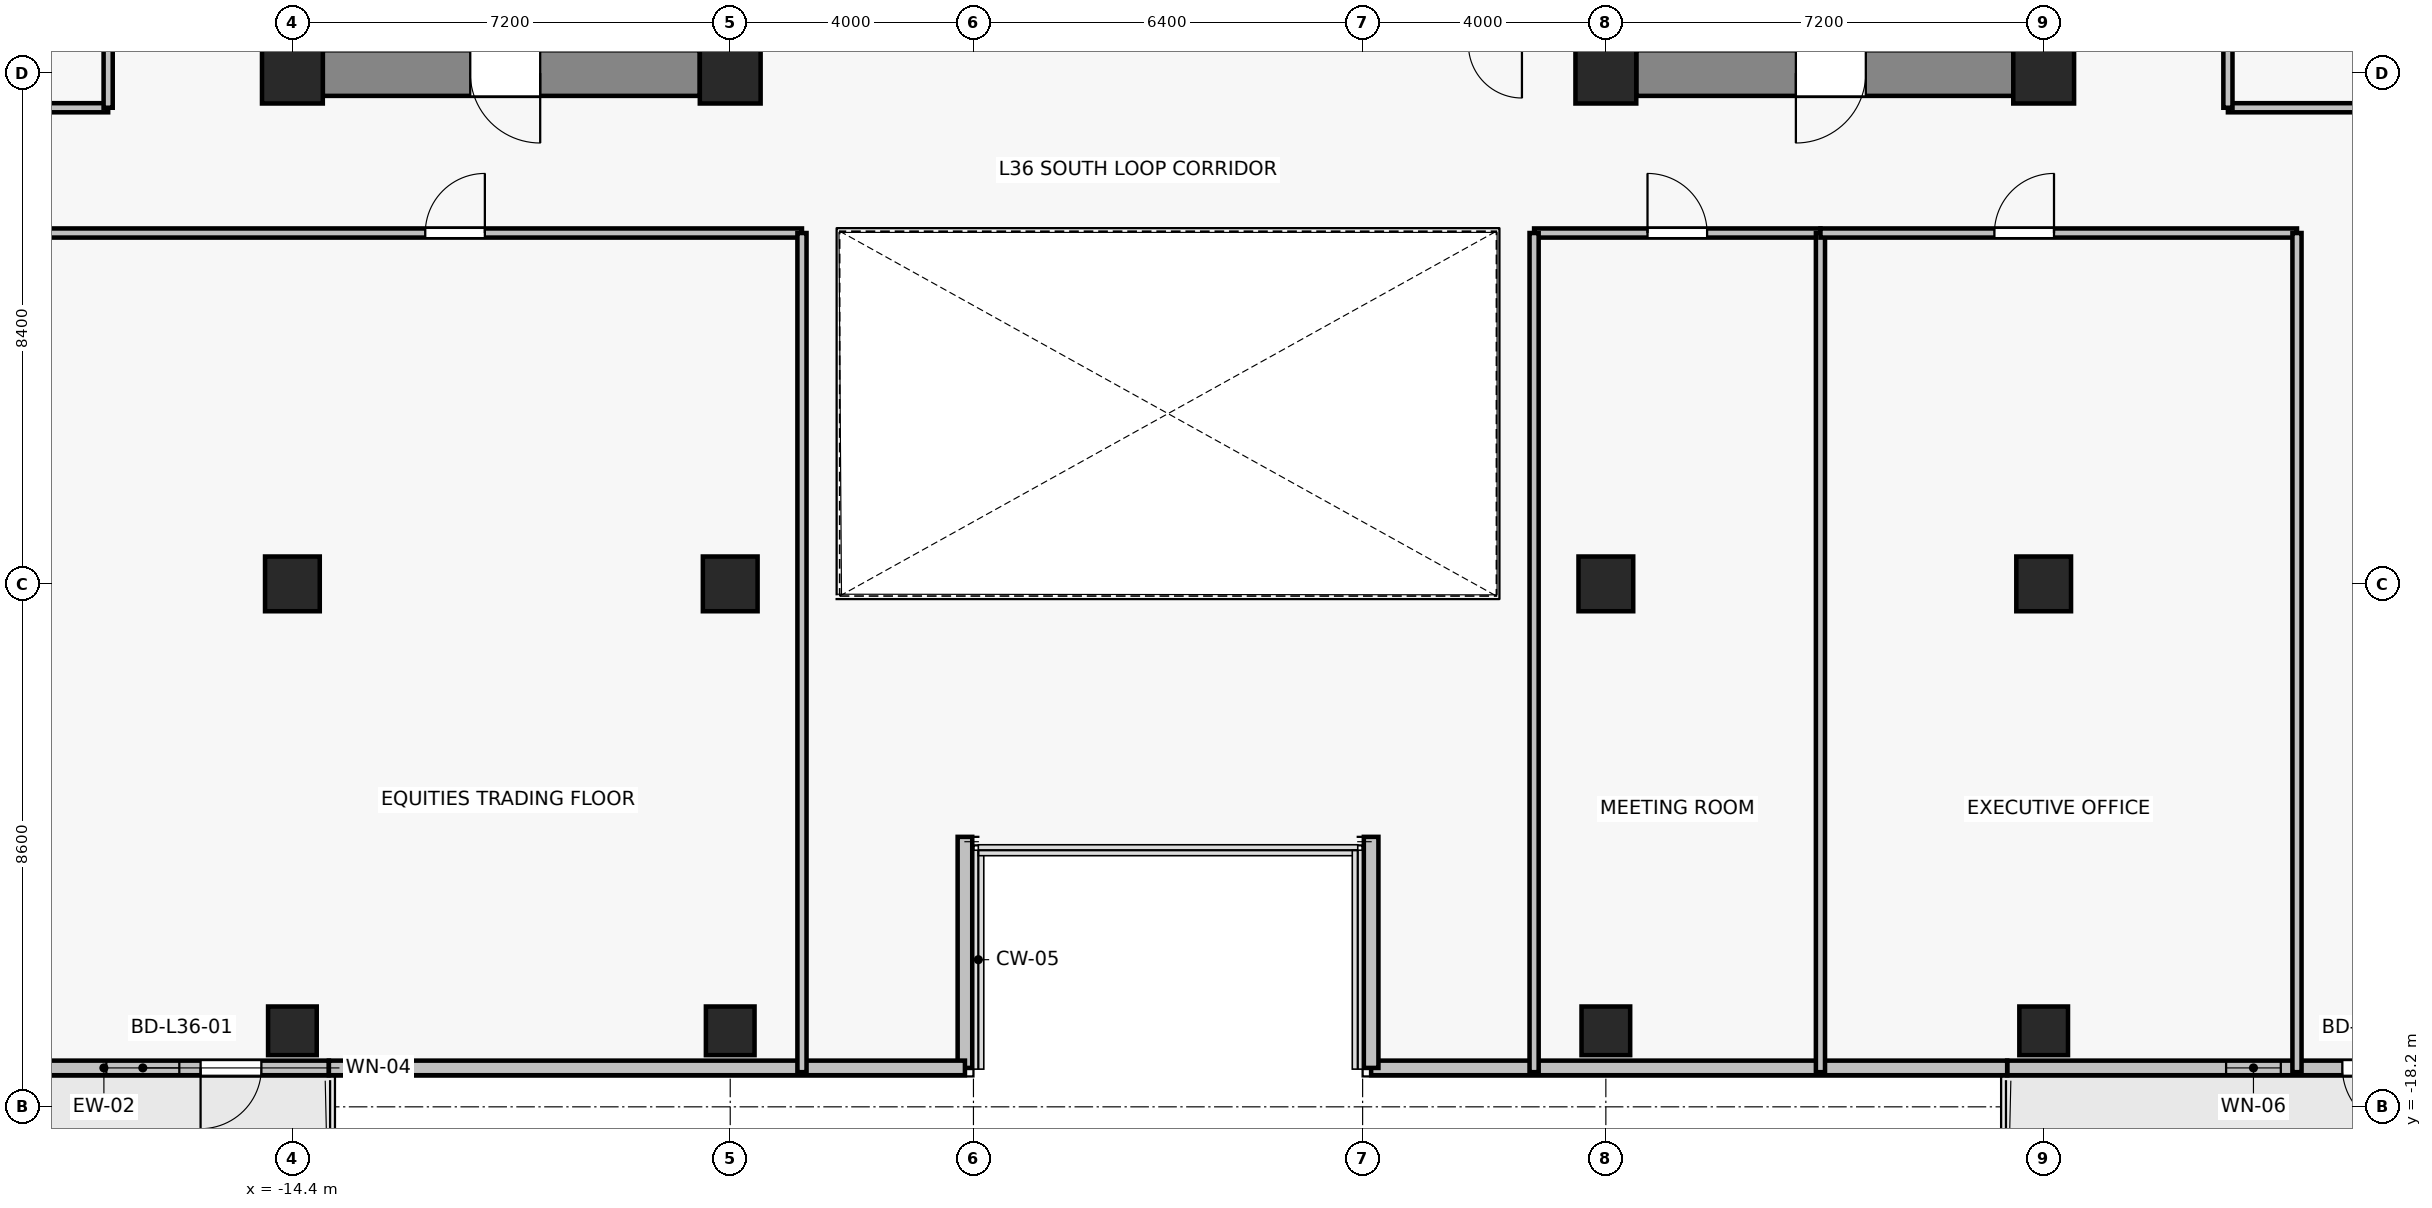
"""IFC4 building model, lengths in metres.
Left out: names, types, materials, properties, quantities, classifications, styles, units other than length and angle.
Written with IfcOpenShell. Run it as: python <this file> out.ifc"""

import sys

from ifc_helpers import new_model, si_unit, direction, frame, frame_2d, origin, origin_2d, place, context, subcontext, project, spatial, rectangle, extrude, source, transform, mapped, element, fill, save


model = new_model("IFC4")
c1 = context("Model", 3, precision=1e-05, world=origin(), true_north=direction((0.0, 1.0)))
c2 = subcontext(c1, "Body", "Model", "MODEL_VIEW")
j1 = project(units=[si_unit("LENGTHUNIT", "METRE"), si_unit("PLANEANGLEUNIT", "RADIAN")], contexts=[c1])
p1 = place(None, origin())
s1 = spatial("IfcSite", under=j1, at=p1, CompositionType="ELEMENT")
p2 = place(p1, origin())
s2 = spatial("IfcBuilding", under=s1, at=p2, CompositionType="ELEMENT")
p3 = place(p2, frame((0.0, 0.0, 129.7)))
s3 = spatial("IfcBuildingStorey", under=s2, at=p3, CompositionType="ELEMENT", Elevation=129.7)
for number, where, z_axis, x_axis in (
    (1, (-14.4, -1.2, 0.0), (0.0, 0.0, 1.0), (1.0, 0.0, 0.0)),
    (2, (-7.2, -1.2, 0.0), (0.0, 0.0, 1.0), (1.0, 0.0, 0.0)),
    (3, (7.2, -1.2, 0.0), (0.0, 0.0, 1.0), (1.0, 0.0, 0.0)),
    (4, (14.4, -1.2, 0.0), (0.0, 0.0, 1.0), (1.0, 0.0, 0.0)),
):
    element("IfcColumn", number, at=place(p3, frame(where, z_axis=z_axis, x_axis=x_axis)), inside=s3, PredefinedType="COLUMN", context=c2, shape_type="SweptSolid", body=[
        extrude(rectangle(XDim=1.0, YDim=1.0, at=origin_2d()), origin(), (0.0, 0.0, 1.0), 3.3),
    ])
for number, where, z_axis, x_axis in (
    (5, (-14.4, -9.6, 0.0), (0.0, 0.0, 1.0), (1.0, 0.0, 0.0)),
    (6, (-7.2, -9.6, 0.0), (0.0, 0.0, 1.0), (1.0, 0.0, 0.0)),
    (7, (7.2, -9.6, 0.0), (0.0, 0.0, 1.0), (1.0, 0.0, 0.0)),
    (8, (14.4, -9.6, 0.0), (0.0, 0.0, 1.0), (1.0, 0.0, 0.0)),
):
    element("IfcColumn", number, at=place(p3, frame(where, z_axis=z_axis, x_axis=x_axis)), inside=s3, PredefinedType="COLUMN", context=c2, shape_type="SweptSolid", body=[
        extrude(rectangle(XDim=0.9, YDim=0.9, at=origin_2d()), origin(), (0.0, 0.0, 1.0), 3.3),
    ])
for number, where, z_axis, x_axis in (
    (9, (-14.4, -16.95, 0.0), (0.0, 0.0, 1.0), (1.0, 0.0, 0.0)),
    (10, (-7.2, -16.95, 0.0), (0.0, 0.0, 1.0), (1.0, 0.0, 0.0)),
    (11, (7.2, -16.95, 0.0), (0.0, 0.0, 1.0), (1.0, 0.0, 0.0)),
    (12, (14.4, -16.95, 0.0), (0.0, 0.0, 1.0), (1.0, 0.0, 0.0)),
):
    element("IfcColumn", number, at=place(p3, frame(where, z_axis=z_axis, x_axis=x_axis)), inside=s3, PredefinedType="COLUMN", context=c2, shape_type="SweptSolid", body=[
        extrude(rectangle(XDim=0.8, YDim=0.8, at=origin_2d()), origin(), (0.0, 0.0, 1.0), 3.3),
    ])
p4 = place(p3, frame((-7.7, -1.2, 0.0), z_axis=(0.0, 0.0, 1.0), x_axis=(-1.0, 0.0, 0.0)))
e13 = element("IfcWall", 13, at=p4, inside=s3, PredefinedType="SHEAR", context=c2, shape_type="SweptSolid", body=[
    extrude(rectangle(XDim=6.2, YDim=0.75, at=frame_2d((3.1, 0.0))), origin(), (0.0, 0.0, 1.0), 3.075),
])
p5 = place(p4, frame((2.625, 0.0, 0.0)))
e14 = element("IfcOpeningElement", 14, at=p5, cuts=e13, PredefinedType="OPENING", context=c2, shape_type="SweptSolid", body=[
    extrude(rectangle(XDim=1.15, YDim=2.15, at=frame_2d((0.575, 1.075))), frame((0.0, 0.385, 0.0), z_axis=(0.0, -1.0, 0.0), x_axis=(1.0, 0.0, 0.0)), (0.0, 0.0, 1.0), 0.77),
])
p6 = place(p3, frame((13.9, -1.2, 0.0), z_axis=(0.0, 0.0, 1.0), x_axis=(-1.0, 0.0, 0.0)))
e15 = element("IfcWall", 15, at=p6, inside=s3, PredefinedType="SHEAR", context=c2, shape_type="SweptSolid", body=[
    extrude(rectangle(XDim=6.2, YDim=0.75, at=frame_2d((3.1, 0.0))), origin(), (0.0, 0.0, 1.0), 3.075),
])
p7 = place(p6, frame((2.425, 0.0, 0.0)))
e16 = element("IfcOpeningElement", 16, at=p7, cuts=e15, PredefinedType="OPENING", context=c2, shape_type="SweptSolid", body=[
    extrude(rectangle(XDim=1.15, YDim=2.15, at=frame_2d((0.575, 1.075))), frame((0.0, 0.385, 0.0), z_axis=(0.0, -1.0, 0.0), x_axis=(1.0, 0.0, 0.0)), (0.0, 0.0, 1.0), 0.77),
])
p8 = place(p3, frame((-13.8, -17.56, 0.0), z_axis=(0.0, 0.0, 1.0), x_axis=(-1.0, 0.0, 0.0)))
e17 = element("IfcWall", 17, at=p8, inside=s3, PredefinedType="SOLIDWALL", context=c2, shape_type="SweptSolid", body=[
    extrude(rectangle(XDim=7.4, YDim=0.24, at=frame_2d((3.7, 0.0))), origin(), (0.0, 0.0, 1.0), 2.665),
])
p9 = place(p8, frame((1.11, 0.0, 0.0)))
e18 = element("IfcOpeningElement", 18, at=p9, cuts=e17, PredefinedType="OPENING", context=c2, shape_type="SweptSolid", body=[
    extrude(rectangle(XDim=1.0, YDim=2.2, at=frame_2d((0.5, 1.1))), frame((0.0, 0.13, 0.0), z_axis=(0.0, -1.0, 0.0), x_axis=(1.0, 0.0, 0.0)), (0.0, 0.0, 1.0), 0.26),
])
p10 = place(p8, frame((2.46, 0.0, 0.85)))
e19 = element("IfcOpeningElement", 19, at=p10, cuts=e17, PredefinedType="OPENING", context=c2, shape_type="SweptSolid", body=[
    extrude(rectangle(XDim=1.2, YDim=1.5, at=frame_2d((0.6, 0.75))), frame((0.0, 0.13, 0.0), z_axis=(0.0, -1.0, 0.0), x_axis=(1.0, 0.0, 0.0)), (0.0, 0.0, 1.0), 0.26),
])
p11 = place(p3, frame((21.2, -17.56, 0.0), z_axis=(0.0, 0.0, 1.0), x_axis=(-1.0, 0.0, 0.0)))
e20 = element("IfcWall", 20, at=p11, inside=s3, PredefinedType="SOLIDWALL", context=c2, shape_type="SweptSolid", body=[
    extrude(rectangle(XDim=7.4, YDim=0.24, at=frame_2d((3.7, 0.0))), origin(), (0.0, 0.0, 1.0), 2.665),
])
p12 = place(p11, frame((0.888, 0.0, 0.0)))
e21 = element("IfcOpeningElement", 21, at=p12, cuts=e20, PredefinedType="OPENING", context=c2, shape_type="SweptSolid", body=[
    extrude(rectangle(XDim=1.0, YDim=2.2, at=frame_2d((0.5, 1.1))), frame((0.0, 0.13, 0.0), z_axis=(0.0, -1.0, 0.0), x_axis=(1.0, 0.0, 0.0)), (0.0, 0.0, 1.0), 0.26),
])
p13 = place(p11, frame((2.9, 0.0, 0.85)))
e22 = element("IfcOpeningElement", 22, at=p13, cuts=e20, PredefinedType="OPENING", context=c2, shape_type="SweptSolid", body=[
    extrude(rectangle(XDim=0.9, YDim=1.35, at=frame_2d((0.45, 0.675))), frame((0.0, 0.13, 0.0), z_axis=(0.0, -1.0, 0.0), x_axis=(1.0, 0.0, 0.0)), (0.0, 0.0, 1.0), 0.26),
])
p14 = place(p3, frame((3.34, -17.56, 0.0), z_axis=(0.0, 0.0, 1.0), x_axis=(1.0, 0.0, 0.0)))
e23 = element("IfcWall", 23, at=p14, inside=s3, PredefinedType="SOLIDWALL", context=c2, shape_type="SweptSolid", body=[
    extrude(rectangle(XDim=10.46, YDim=0.24, at=frame_2d((5.23, 0.0))), origin(), (0.0, 0.0, 1.0), 2.665),
])
for number, where, z_axis, x_axis in (
    (24, (3.34, -13.76, 0.0), (0.0, 0.0, 1.0), (0.0, -1.0, 0.0)),
    (25, (-3.34, -17.56, 0.0), (0.0, 0.0, 1.0), (0.0, 1.0, 0.0)),
):
    element("IfcWall", number, at=place(p3, frame(where, z_axis=z_axis, x_axis=x_axis)), inside=s3, PredefinedType="SOLIDWALL", context=c2, shape_type="SweptSolid", body=[
        extrude(rectangle(XDim=3.8, YDim=0.24, at=frame_2d((1.9, 0.0))), origin(), (0.0, 0.0, 1.0), 2.515),
    ])
p15 = place(p3, frame((-13.8, -17.56, 0.0), z_axis=(0.0, 0.0, 1.0), x_axis=(1.0, 0.0, 0.0)))
e26 = element("IfcWall", 26, at=p15, inside=s3, PredefinedType="SOLIDWALL", context=c2, shape_type="SweptSolid", body=[
    extrude(rectangle(XDim=10.46, YDim=0.24, at=frame_2d((5.23, 0.0))), origin(), (0.0, 0.0, 1.0), 2.665),
])
p16 = place(p3, frame((-25.53, -3.83, 0.0), z_axis=(0.0, 0.0, 1.0), x_axis=(1.0, 0.0, 0.0)))
e27 = element("IfcWall", 27, at=p16, inside=s3, PredefinedType="PARTITIONING", context=c2, shape_type="SweptSolid", body=[
    extrude(rectangle(XDim=19.51, YDim=0.15, at=frame_2d((9.755, 0.0))), origin(), (0.0, 0.0, 1.0), 2.515),
])
p17 = place(p16, frame((13.315, 0.0, 0.0)))
e28 = element("IfcOpeningElement", 28, at=p17, cuts=e27, PredefinedType="OPENING", context=c2, shape_type="SweptSolid", body=[
    extrude(rectangle(XDim=0.98, YDim=2.15, at=frame_2d((0.49, 1.075))), frame((0.0, 0.085, 0.0), z_axis=(0.0, -1.0, 0.0), x_axis=(1.0, 0.0, 0.0)), (0.0, 0.0, 1.0), 0.17),
])
p18 = place(p3, frame((-6.02, -3.83, 0.0), z_axis=(0.0, 0.0, 1.0), x_axis=(0.0, -1.0, 0.0)))
e29 = element("IfcWall", 29, at=p18, inside=s3, PredefinedType="PARTITIONING", context=c2, shape_type="SweptSolid", body=[
    extrude(rectangle(XDim=13.8, YDim=0.15, at=frame_2d((6.9, 0.0))), origin(), (0.0, 0.0, 1.0), 2.515),
])
p19 = place(p3, frame((6.02, -3.83, 0.0), z_axis=(0.0, 0.0, 1.0), x_axis=(1.0, 0.0, 0.0)))
e30 = element("IfcWall", 30, at=p19, inside=s3, PredefinedType="PARTITIONING", context=c2, shape_type="SweptSolid", body=[
    extrude(rectangle(XDim=4.709, YDim=0.15, at=frame_2d((2.354, 0.0))), origin(), (0.0, 0.0, 1.0), 2.515),
])
p20 = place(p19, frame((1.865, 0.0, 0.0)))
e31 = element("IfcOpeningElement", 31, at=p20, cuts=e30, PredefinedType="OPENING", context=c2, shape_type="SweptSolid", body=[
    extrude(rectangle(XDim=0.98, YDim=2.15, at=frame_2d((0.49, 1.075))), frame((0.0, 0.085, 0.0), z_axis=(0.0, -1.0, 0.0), x_axis=(1.0, 0.0, 0.0)), (0.0, 0.0, 1.0), 0.17),
])
for number, where, z_axis, x_axis in (
    (32, (6.02, -17.63, 0.0), (0.0, 0.0, 1.0), (0.0, 1.0, 0.0)),
    (33, (10.729, -3.83, 0.0), (0.0, 0.0, 1.0), (0.0, -1.0, 0.0)),
):
    element("IfcWall", number, at=place(p3, frame(where, z_axis=z_axis, x_axis=x_axis)), inside=s3, PredefinedType="PARTITIONING", context=c2, shape_type="SweptSolid", body=[
        extrude(rectangle(XDim=13.8, YDim=0.15, at=frame_2d((6.9, 0.0))), origin(), (0.0, 0.0, 1.0), 2.515),
    ])
p21 = place(p3, frame((10.729, -3.83, 0.0), z_axis=(0.0, 0.0, 1.0), x_axis=(1.0, 0.0, 0.0)))
e34 = element("IfcWall", 34, at=p21, inside=s3, PredefinedType="PARTITIONING", context=c2, shape_type="SweptSolid", body=[
    extrude(rectangle(XDim=7.837, YDim=0.15, at=frame_2d((3.918, 0.0))), origin(), (0.0, 0.0, 1.0), 2.515),
])
p22 = place(p21, frame((2.861, 0.0, 0.0)))
e35 = element("IfcOpeningElement", 35, at=p22, cuts=e34, PredefinedType="OPENING", context=c2, shape_type="SweptSolid", body=[
    extrude(rectangle(XDim=0.98, YDim=2.15, at=frame_2d((0.49, 1.075))), frame((0.0, 0.085, 0.0), z_axis=(0.0, -1.0, 0.0), x_axis=(1.0, 0.0, 0.0)), (0.0, 0.0, 1.0), 0.17),
])
p23 = place(p3, frame((18.566, -3.83, 0.0), z_axis=(0.0, 0.0, 1.0), x_axis=(0.0, -1.0, 0.0)))
e36 = element("IfcWall", 36, at=p23, inside=s3, PredefinedType="PARTITIONING", context=c2, shape_type="SweptSolid", body=[
    extrude(rectangle(XDim=13.8, YDim=0.15, at=frame_2d((6.9, 0.0))), origin(), (0.0, 0.0, 1.0), 2.515),
])
p24 = place(p3, frame((-17.43, -1.77, 0.0), z_axis=(0.0, 0.0, 1.0), x_axis=(-1.0, 0.0, 0.0)))
e37 = element("IfcWall", 37, at=p24, inside=s3, PredefinedType="PARTITIONING", context=c2, shape_type="SweptSolid", body=[
    extrude(rectangle(XDim=8.1, YDim=0.15, at=frame_2d((4.05, 0.0))), origin(), (0.0, 0.0, 1.0), 2.515),
])
p25 = place(p3, frame((-17.43, 13.88, 0.0), z_axis=(0.0, 0.0, 1.0), x_axis=(0.0, -1.0, 0.0)))
e38 = element("IfcWall", 38, at=p25, inside=s3, PredefinedType="PARTITIONING", context=c2, shape_type="SweptSolid", body=[
    extrude(rectangle(XDim=15.65, YDim=0.15, at=frame_2d((7.825, 0.0))), origin(), (0.0, 0.0, 1.0), 2.515),
])
p26 = place(p25, frame((7.335, 0.0, 0.0)))
e39 = element("IfcOpeningElement", 39, at=p26, cuts=e38, PredefinedType="OPENING", context=c2, shape_type="SweptSolid", body=[
    extrude(rectangle(XDim=0.98, YDim=2.15, at=frame_2d((0.49, 1.075))), frame((0.0, 0.085, 0.0), z_axis=(0.0, -1.0, 0.0), x_axis=(1.0, 0.0, 0.0)), (0.0, 0.0, 1.0), 0.17),
])
p27 = place(p3, frame((29.53, -1.77, 0.0), z_axis=(0.0, 0.0, 1.0), x_axis=(-1.0, 0.0, 0.0)))
e40 = element("IfcWall", 40, at=p27, inside=s3, PredefinedType="PARTITIONING", context=c2, shape_type="SweptSolid", body=[
    extrude(rectangle(XDim=12.1, YDim=0.15, at=frame_2d((6.05, 0.0))), origin(), (0.0, 0.0, 1.0), 2.515),
])
p28 = place(p3, frame((17.43, -1.77, 0.0), z_axis=(0.0, 0.0, 1.0), x_axis=(0.0, 1.0, 0.0)))
e41 = element("IfcWall", 41, at=p28, inside=s3, PredefinedType="PARTITIONING", context=c2, shape_type="SweptSolid", body=[
    extrude(rectangle(XDim=3.23, YDim=0.15, at=frame_2d((1.615, 0.0))), origin(), (0.0, 0.0, 1.0), 2.515),
])
p29 = place(p28, frame((1.125, 0.0, 0.0)))
e42 = element("IfcOpeningElement", 42, at=p29, cuts=e41, PredefinedType="OPENING", context=c2, shape_type="SweptSolid", body=[
    extrude(rectangle(XDim=0.98, YDim=2.15, at=frame_2d((0.49, 1.075))), frame((0.0, 0.085, 0.0), z_axis=(0.0, -1.0, 0.0), x_axis=(1.0, 0.0, 0.0)), (0.0, 0.0, 1.0), 0.17),
])
m1 = source(origin(), c2, "Body", "SweptSolid", [
    extrude(rectangle(XDim=1.0, YDim=2.2, at=frame_2d((0.5, 1.1))), frame((0.0, 0.025, 0.0), z_axis=(0.0, -1.0, 0.0), x_axis=(1.0, 0.0, 0.0)), (0.0, 0.0, 1.0), 0.05),
])
p30 = place(p9, origin())
e43 = element("IfcDoor", 43, at=p30, inside=s3, OperationType="SINGLE_SWING_RIGHT", PredefinedType="DOOR", context=c2, shape_type="MappedRepresentation", body=[
    mapped(m1, transform((0.0, 0.0, 0.0), x_axis=(1.0, 0.0, 0.0), y_axis=(0.0, 1.0, 0.0), z_axis=(0.0, 0.0, 1.0), scale=1.0)),
])
fill(e18, e43)
m2 = source(origin(), c2, "Body", "SweptSolid", [
    extrude(rectangle(XDim=1.2, YDim=1.5, at=frame_2d((0.6, 0.75))), frame((0.0, 0.03, 0.0), z_axis=(0.0, -1.0, 0.0), x_axis=(1.0, 0.0, 0.0)), (0.0, 0.0, 1.0), 0.06),
])
p31 = place(p10, origin())
e44 = element("IfcWindow", 44, at=p31, inside=s3, PartitioningType="SINGLE_PANEL", PredefinedType="WINDOW", context=c2, shape_type="MappedRepresentation", body=[
    mapped(m2, transform((0.0, 0.0, 0.0), x_axis=(1.0, 0.0, 0.0), y_axis=(0.0, 1.0, 0.0), z_axis=(0.0, 0.0, 1.0), scale=1.0)),
])
fill(e19, e44)
p32 = place(p12, origin())
e45 = element("IfcDoor", 45, at=p32, inside=s3, OperationType="SINGLE_SWING_LEFT", PredefinedType="DOOR", context=c2, shape_type="MappedRepresentation", body=[
    mapped(m1, transform((0.0, 0.0, 0.0), x_axis=(1.0, 0.0, 0.0), y_axis=(0.0, 1.0, 0.0), z_axis=(0.0, 0.0, 1.0), scale=1.0)),
])
fill(e21, e45)
m3 = source(origin(), c2, "Body", "SweptSolid", [
    extrude(rectangle(XDim=0.9, YDim=1.35, at=frame_2d((0.45, 0.675))), frame((0.0, 0.03, 0.0), z_axis=(0.0, -1.0, 0.0), x_axis=(1.0, 0.0, 0.0)), (0.0, 0.0, 1.0), 0.06),
])
p33 = place(p13, origin())
e46 = element("IfcWindow", 46, at=p33, inside=s3, PartitioningType="SINGLE_PANEL", PredefinedType="WINDOW", context=c2, shape_type="MappedRepresentation", body=[
    mapped(m3, transform((0.0, 0.0, 0.0), x_axis=(1.0, 0.0, 0.0), y_axis=(0.0, 1.0, 0.0), z_axis=(0.0, 0.0, 1.0), scale=1.0)),
])
fill(e22, e46)
m4 = source(origin(), c2, "Body", "SweptSolid", [
    extrude(rectangle(XDim=1.15, YDim=2.15, at=frame_2d((0.575, 1.075))), frame((0.0, 0.025, 0.0), z_axis=(0.0, -1.0, 0.0), x_axis=(1.0, 0.0, 0.0)), (0.0, 0.0, 1.0), 0.05),
])
p34 = place(p5, origin())
e47 = element("IfcDoor", 47, at=p34, inside=s3, OperationType="SINGLE_SWING_LEFT", PredefinedType="DOOR", context=c2, shape_type="MappedRepresentation", body=[
    mapped(m4, transform((0.0, 0.0, 0.0), x_axis=(1.0, 0.0, 0.0), y_axis=(0.0, 1.0, 0.0), z_axis=(0.0, 0.0, 1.0), scale=1.0)),
])
fill(e14, e47)
p35 = place(p7, origin())
e48 = element("IfcDoor", 48, at=p35, inside=s3, OperationType="SINGLE_SWING_RIGHT", PredefinedType="DOOR", context=c2, shape_type="MappedRepresentation", body=[
    mapped(m4, transform((0.0, 0.0, 0.0), x_axis=(1.0, 0.0, 0.0), y_axis=(0.0, 1.0, 0.0), z_axis=(0.0, 0.0, 1.0), scale=1.0)),
])
fill(e16, e48)
m5 = source(origin(), c2, "Body", "SweptSolid", [
    extrude(rectangle(XDim=0.98, YDim=2.15, at=frame_2d((0.49, 1.075))), frame((0.0, 0.025, 0.0), z_axis=(0.0, -1.0, 0.0), x_axis=(1.0, 0.0, 0.0)), (0.0, 0.0, 1.0), 0.05),
])
p36 = place(p17, origin())
e49 = element("IfcDoor", 49, at=p36, inside=s3, OperationType="SINGLE_SWING_RIGHT", PredefinedType="DOOR", context=c2, shape_type="MappedRepresentation", body=[
    mapped(m5, transform((0.0, 0.0, 0.0), x_axis=(1.0, 0.0, 0.0), y_axis=(0.0, 1.0, 0.0), z_axis=(0.0, 0.0, 1.0), scale=1.0)),
])
fill(e28, e49)
p37 = place(p20, origin())
e50 = element("IfcDoor", 50, at=p37, inside=s3, OperationType="SINGLE_SWING_LEFT", PredefinedType="DOOR", context=c2, shape_type="MappedRepresentation", body=[
    mapped(m5, transform((0.0, 0.0, 0.0), x_axis=(1.0, 0.0, 0.0), y_axis=(0.0, 1.0, 0.0), z_axis=(0.0, 0.0, 1.0), scale=1.0)),
])
fill(e31, e50)
p38 = place(p22, origin())
e51 = element("IfcDoor", 51, at=p38, inside=s3, OperationType="SINGLE_SWING_RIGHT", PredefinedType="DOOR", context=c2, shape_type="MappedRepresentation", body=[
    mapped(m5, transform((0.0, 0.0, 0.0), x_axis=(1.0, 0.0, 0.0), y_axis=(0.0, 1.0, 0.0), z_axis=(0.0, 0.0, 1.0), scale=1.0)),
])
fill(e35, e51)
save(model, sys.argv[1])
